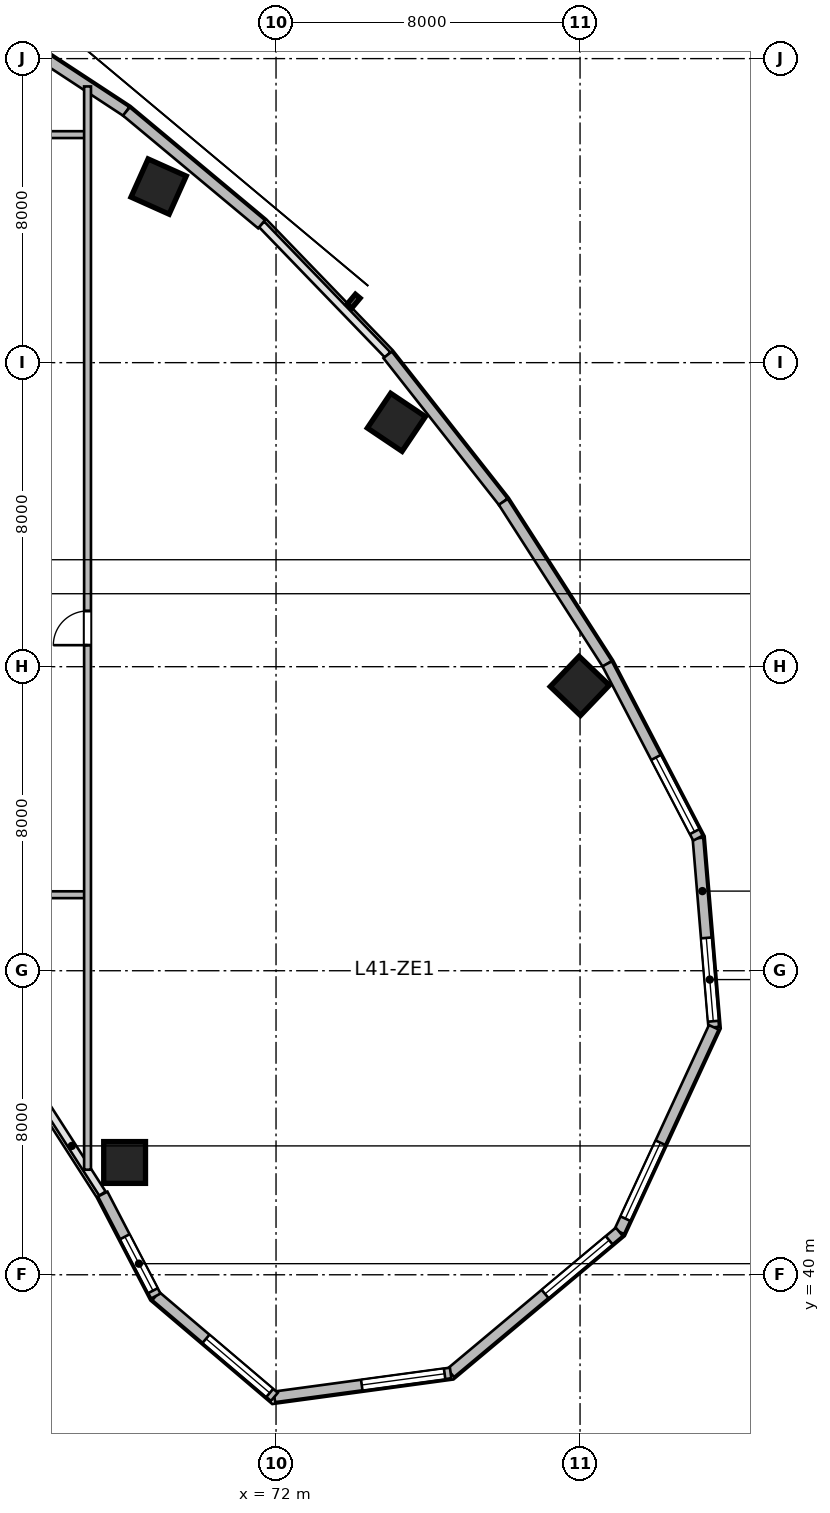
"""IFC4 building model, lengths in metres.
Left out: names, types, materials, properties, quantities, classifications, styles, units other than length and angle.
Written with IfcOpenShell. Run it as: python <this file> out.ifc"""

import sys

from ifc_helpers import new_model, si_unit, direction, frame, frame_2d, origin, origin_2d, place, context, subcontext, project, spatial, rectangle, circle, extrude, source, transform, mapped, element, fill, save


model = new_model("IFC4")
c1 = context("Model", 3, precision=1e-05, world=origin(), true_north=direction((0.0, 1.0)))
c2 = subcontext(c1, "Body", "Model", "MODEL_VIEW")
j1 = project(units=[si_unit("LENGTHUNIT", "METRE"), si_unit("PLANEANGLEUNIT", "RADIAN")], contexts=[c1])
p1 = place(None, origin())
s1 = spatial("IfcSite", under=j1, at=p1, CompositionType="ELEMENT")
p2 = place(p1, origin())
s2 = spatial("IfcBuilding", under=s1, at=p2, CompositionType="ELEMENT")
p3 = place(p2, frame((0.0, 0.0, 170.1)))
s3 = spatial("IfcBuildingStorey", under=s2, at=p3, CompositionType="ELEMENT", Elevation=170.1)
m1 = source(origin(), c2, "Body", "SweptSolid", [
    extrude(rectangle(XDim=1.1, YDim=1.1, at=origin_2d()), origin(), (0.0, 0.0, 1.0), 3.9),
])
for number, where, z_axis, x_axis in (
    (1, (68.91, 68.633, 0.0), (0.0, 0.0, 1.0), (0.409, 0.912, 0.0)),
    (2, (75.167, 62.43, 0.0), (0.0, 0.0, 1.0), (0.558, 0.83, 0.0)),
):
    element("IfcColumn", number, at=place(p3, frame(where, z_axis=z_axis, x_axis=x_axis)), inside=s3, PredefinedType="COLUMN", context=c2, shape_type="MappedRepresentation", body=[
        mapped(m1, transform((0.0, 0.0, 0.0), scale=1.0)),
    ])
m2 = source(origin(), c2, "Body", "SweptSolid", [
    extrude(circle(Radius=0.55, at=origin_2d()), origin(), (0.0, 0.0, 1.0), 3.9),
])
p4 = place(p3, frame((68.015, 42.955, 0.0), z_axis=(0.0, 0.0, 1.0), x_axis=(0.690756218984, 0.723087716626, 0.0)))
e3 = element("IfcColumn", 3, at=p4, inside=s3, PredefinedType="COLUMN", context=c2, shape_type="MappedRepresentation", body=[
    mapped(m2, transform((0.0, 0.0, 0.0), scale=1.0)),
])
p5 = place(p3, frame((79.993, 55.494, 0.0), z_axis=(0.0, 0.0, 1.0), x_axis=(0.690756218984, 0.723087716626, 0.0)))
e4 = element("IfcColumn", 4, at=p5, inside=s3, PredefinedType="COLUMN", context=c2, shape_type="MappedRepresentation", body=[
    mapped(m1, transform((0.0, 0.0, 0.0), scale=1.0)),
])
m3 = source(origin(), c2, "Body", "SweptSolid", [
    extrude(rectangle(XDim=4.994, YDim=0.28, at=frame_2d((2.497, 0.0))), origin(), (0.0, 0.0, 1.0), 3.65),
])
p6 = place(p3, frame((83.102, 51.489, 0.0), z_axis=(0.0, 0.0, 1.0), x_axis=(0.083344839916, -0.996520766296, 0.0)))
e5 = element("IfcWall", 5, at=p6, inside=s3, PredefinedType="SOLIDWALL", context=c2, shape_type="MappedRepresentation", body=[
    mapped(m3, transform((0.0, 0.0, 0.0), scale=1.0)),
])
p7 = place(p6, frame((2.635, 0.0, 0.95)))
e6 = element("IfcOpeningElement", 6, at=p7, cuts=e5, PredefinedType="OPENING", context=c2, shape_type="SweptSolid", body=[
    extrude(rectangle(XDim=2.2, YDim=2.1, at=frame_2d((1.1, 1.05))), frame((0.0, 0.15, 0.0), z_axis=(0.0, -1.0, 0.0), x_axis=(1.0, 0.0, 0.0)), (0.0, 0.0, 1.0), 0.3),
])
m4 = source(origin(), c2, "Body", "SweptSolid", [
    extrude(rectangle(XDim=5.927, YDim=0.28, at=frame_2d((2.964, 0.0))), origin(), (0.0, 0.0, 1.0), 3.65),
])
p8 = place(p3, frame((83.519, 46.512, 0.0), z_axis=(0.0, 0.0, 1.0), x_axis=(-0.419656204795, -0.907683132914, 0.0)))
e7 = element("IfcWall", 7, at=p8, inside=s3, PredefinedType="SOLIDWALL", context=c2, shape_type="MappedRepresentation", body=[
    mapped(m4, transform((0.0, 0.0, 0.0), scale=1.0)),
])
p9 = place(p8, frame((3.346, 0.0, 0.95)))
e8 = element("IfcOpeningElement", 8, at=p9, cuts=e7, PredefinedType="OPENING", context=c2, shape_type="SweptSolid", body=[
    extrude(rectangle(XDim=2.2, YDim=2.1, at=frame_2d((1.1, 1.05))), frame((0.0, 0.15, 0.0), z_axis=(0.0, -1.0, 0.0), x_axis=(1.0, 0.0, 0.0)), (0.0, 0.0, 1.0), 0.3),
])
m5 = source(origin(), c2, "Body", "SweptSolid", [
    extrude(rectangle(XDim=5.786, YDim=0.28, at=frame_2d((2.893, 0.0))), origin(), (0.0, 0.0, 1.0), 3.65),
])
p10 = place(p3, frame((81.031, 41.131, 0.0), z_axis=(0.0, 0.0, 1.0), x_axis=(-0.766711306852, -0.641992034176, 0.0)))
e9 = element("IfcWall", 9, at=p10, inside=s3, PredefinedType="SOLIDWALL", context=c2, shape_type="MappedRepresentation", body=[
    mapped(m5, transform((0.0, 0.0, 0.0), scale=1.0)),
])
p11 = place(p10, frame((0.347, 0.0, 0.95)))
e10 = element("IfcOpeningElement", 10, at=p11, cuts=e9, PredefinedType="OPENING", context=c2, shape_type="SweptSolid", body=[
    extrude(rectangle(XDim=2.2, YDim=2.1, at=frame_2d((1.1, 1.05))), frame((0.0, 0.15, 0.0), z_axis=(0.0, -1.0, 0.0), x_axis=(1.0, 0.0, 0.0)), (0.0, 0.0, 1.0), 0.3),
])
m6 = source(origin(), c2, "Body", "SweptSolid", [
    extrude(rectangle(XDim=4.68, YDim=0.28, at=frame_2d((2.34, 0.0))), origin(), (0.0, 0.0, 1.0), 3.65),
])
p12 = place(p3, frame((76.594, 37.417, 0.0), z_axis=(0.0, 0.0, 1.0), x_axis=(-0.990931146435, -0.134370618162, 0.0)))
e11 = element("IfcWall", 11, at=p12, inside=s3, PredefinedType="SOLIDWALL", context=c2, shape_type="MappedRepresentation", body=[
    mapped(m6, transform((0.0, 0.0, 0.0), scale=1.0)),
])
p13 = place(p12, frame((0.16, 0.0, 0.95)))
e12 = element("IfcOpeningElement", 12, at=p13, cuts=e11, PredefinedType="OPENING", context=c2, shape_type="SweptSolid", body=[
    extrude(rectangle(XDim=2.2, YDim=2.1, at=frame_2d((1.1, 1.05))), frame((0.0, 0.15, 0.0), z_axis=(0.0, -1.0, 0.0), x_axis=(1.0, 0.0, 0.0)), (0.0, 0.0, 1.0), 0.3),
])
m7 = source(origin(), c2, "Body", "SweptSolid", [
    extrude(rectangle(XDim=4.096, YDim=0.28, at=frame_2d((2.048, 0.0))), origin(), (0.0, 0.0, 1.0), 3.65),
])
p14 = place(p3, frame((71.957, 36.788, 0.0), z_axis=(0.0, 0.0, 1.0), x_axis=(-0.761926081737, 0.647663991564, 0.0)))
e13 = element("IfcWall", 13, at=p14, inside=s3, PredefinedType="SOLIDWALL", context=c2, shape_type="MappedRepresentation", body=[
    mapped(m7, transform((0.0, 0.0, 0.0), scale=1.0)),
])
p15 = place(p14, frame((0.16, 0.0, 0.95)))
e14 = element("IfcOpeningElement", 14, at=p15, cuts=e13, PredefinedType="OPENING", context=c2, shape_type="SweptSolid", body=[
    extrude(rectangle(XDim=2.2, YDim=2.1, at=frame_2d((1.1, 1.05))), frame((0.0, 0.15, 0.0), z_axis=(0.0, -1.0, 0.0), x_axis=(1.0, 0.0, 0.0)), (0.0, 0.0, 1.0), 0.3),
])
m8 = source(origin(), c2, "Body", "SweptSolid", [
    extrude(rectangle(XDim=3.024, YDim=0.28, at=frame_2d((1.512, 0.0))), origin(), (0.0, 0.0, 1.0), 3.65),
])
p16 = place(p3, frame((68.836, 39.44, 0.0), z_axis=(0.0, 0.0, 1.0), x_axis=(-0.461718746531, 0.887026380161, 0.0)))
e15 = element("IfcWall", 15, at=p16, inside=s3, PredefinedType="SOLIDWALL", context=c2, shape_type="MappedRepresentation", body=[
    mapped(m8, transform((0.0, 0.0, 0.0), scale=1.0)),
])
p17 = place(p16, frame((0.16, 0.0, 0.95)))
e16 = element("IfcOpeningElement", 16, at=p17, cuts=e15, PredefinedType="OPENING", context=c2, shape_type="SweptSolid", body=[
    extrude(rectangle(XDim=1.6, YDim=1.9, at=frame_2d((0.8, 0.95))), frame((0.0, 0.15, 0.0), z_axis=(0.0, -1.0, 0.0), x_axis=(1.0, 0.0, 0.0)), (0.0, 0.0, 1.0), 0.3),
])
m9 = source(origin(), c2, "Body", "SweptSolid", [
    extrude(rectangle(XDim=4.501, YDim=0.28, at=frame_2d((2.25, 0.0))), origin(), (0.0, 0.0, 1.0), 3.65),
])
p18 = place(p3, frame((64.298, 73.08, 0.0), z_axis=(0.0, 0.0, 1.0), x_axis=(0.835984920737, -0.548752414391, 0.0)))
e17 = element("IfcWall", 17, at=p18, inside=s3, PredefinedType="SOLIDWALL", context=c2, shape_type="MappedRepresentation", body=[
    mapped(m9, transform((0.0, 0.0, 0.0), scale=1.0)),
])
m10 = source(origin(), c2, "Body", "SweptSolid", [
    extrude(rectangle(XDim=4.634, YDim=0.28, at=frame_2d((2.317, 0.0))), origin(), (0.0, 0.0, 1.0), 3.65),
])
p19 = place(p3, frame((68.061, 70.61, 0.0), z_axis=(0.0, 0.0, 1.0), x_axis=(0.767910229096, -0.640557475993, 0.0)))
e18 = element("IfcWall", 18, at=p19, inside=s3, PredefinedType="SOLIDWALL", context=c2, shape_type="MappedRepresentation", body=[
    mapped(m10, transform((0.0, 0.0, 0.0), scale=1.0)),
])
m11 = source(origin(), c2, "Body", "SweptSolid", [
    extrude(rectangle(XDim=4.922, YDim=0.28, at=frame_2d((2.461, 0.0))), origin(), (0.0, 0.0, 1.0), 3.65),
])
p20 = place(p3, frame((74.936, 64.206, 0.0), z_axis=(0.0, 0.0, 1.0), x_axis=(0.61817639101, -0.786039407153, 0.0)))
e19 = element("IfcWall", 19, at=p20, inside=s3, PredefinedType="SOLIDWALL", context=c2, shape_type="MappedRepresentation", body=[
    mapped(m11, transform((0.0, 0.0, 0.0), scale=1.0)),
])
m12 = source(origin(), c2, "Body", "SweptSolid", [
    extrude(rectangle(XDim=5.065, YDim=0.28, at=frame_2d((2.532, 0.0))), origin(), (0.0, 0.0, 1.0), 3.65),
])
p21 = place(p3, frame((77.979, 60.338, 0.0), z_axis=(0.0, 0.0, 1.0), x_axis=(0.540177618806, -0.841551032404, 0.0)))
e20 = element("IfcWall", 20, at=p21, inside=s3, PredefinedType="SOLIDWALL", context=c2, shape_type="MappedRepresentation", body=[
    mapped(m12, transform((0.0, 0.0, 0.0), scale=1.0)),
])
m13 = source(origin(), c2, "Body", "SweptSolid", [
    extrude(rectangle(XDim=5.171, YDim=0.28, at=frame_2d((2.585, 0.0))), origin(), (0.0, 0.0, 1.0), 3.65),
])
p22 = place(p3, frame((80.715, 56.075, 0.0), z_axis=(0.0, 0.0, 1.0), x_axis=(0.461752581363, -0.887008767491, 0.0)))
e21 = element("IfcWall", 21, at=p22, inside=s3, PredefinedType="SOLIDWALL", context=c2, shape_type="MappedRepresentation", body=[
    mapped(m13, transform((0.0, 0.0, 0.0), scale=1.0)),
])
p23 = place(p22, frame((2.778, 0.0, 0.95)))
e22 = element("IfcOpeningElement", 22, at=p23, cuts=e21, PredefinedType="OPENING", context=c2, shape_type="SweptSolid", body=[
    extrude(rectangle(XDim=2.2, YDim=2.1, at=frame_2d((1.1, 1.05))), frame((0.0, 0.15, 0.0), z_axis=(0.0, -1.0, 0.0), x_axis=(1.0, 0.0, 0.0)), (0.0, 0.0, 1.0), 0.3),
])
m14 = source(origin(), c2, "Body", "SweptSolid", [
    extrude(rectangle(XDim=2.5, YDim=0.18, at=frame_2d((1.25, 0.0))), origin(), (0.0, 0.0, 1.0), 3.65),
])
p24 = place(p3, frame((64.5, 50.0, 0.0), z_axis=(0.0, 0.0, 1.0), x_axis=(1.0, 0.0, 0.0)))
e23 = element("IfcWall", 23, at=p24, inside=s3, PredefinedType="PLUMBINGWALL", context=c2, shape_type="MappedRepresentation", body=[
    mapped(m14, transform((0.0, 0.0, 0.0), scale=1.0)),
])
m15 = source(origin(), c2, "Body", "SweptSolid", [
    extrude(rectangle(XDim=2.5, YDim=0.18, at=frame_2d((1.25, 0.0))), origin(), (0.0, 0.0, 1.0), 3.022),
])
p25 = place(p3, frame((64.5, 70.0, 0.0), z_axis=(0.0, 0.0, 1.0), x_axis=(1.0, 0.0, 0.0)))
e24 = element("IfcWall", 24, at=p25, inside=s3, PredefinedType="PLUMBINGWALL", context=c2, shape_type="MappedRepresentation", body=[
    mapped(m15, transform((0.0, 0.0, 0.0), scale=1.0)),
])
m16 = source(origin(), c2, "Body", "SweptSolid", [
    extrude(rectangle(XDim=28.503, YDim=0.18, at=frame_2d((14.251, 0.0))), origin(), (0.0, 0.0, 1.0), 2.942),
])
p26 = place(p3, frame((67.04, 42.765, 0.0), z_axis=(0.0, 0.0, 1.0), x_axis=(0.0, 1.0, 0.0)))
e25 = element("IfcWall", 25, at=p26, inside=s3, PredefinedType="PLUMBINGWALL", context=c2, shape_type="MappedRepresentation", body=[
    mapped(m16, transform((0.0, 0.0, 0.0), scale=1.0)),
])
p27 = place(p26, frame((13.802, 0.0, 0.0)))
e26 = element("IfcOpeningElement", 26, at=p27, cuts=e25, PredefinedType="OPENING", context=c2, shape_type="SweptSolid", body=[
    extrude(rectangle(XDim=0.9, YDim=2.08, at=frame_2d((0.45, 1.04))), frame((0.0, 0.1, 0.0), z_axis=(0.0, -1.0, 0.0), x_axis=(1.0, 0.0, 0.0)), (0.0, 0.0, 1.0), 0.2),
])
m17 = source(origin(), c2, "Body", "SweptSolid", [
    extrude(rectangle(XDim=2.2, YDim=2.1, at=frame_2d((1.1, 1.05))), frame((0.0, 0.03, 0.0), z_axis=(0.0, -1.0, 0.0), x_axis=(1.0, 0.0, 0.0)), (0.0, 0.0, 1.0), 0.06),
])
p28 = place(p7, origin())
e27 = element("IfcWindow", 27, at=p28, inside=s3, PartitioningType="TRIPLE_PANEL_VERTICAL", PredefinedType="WINDOW", context=c2, shape_type="MappedRepresentation", body=[
    mapped(m17, transform((0.0, 0.0, 0.0), scale=1.0)),
])
fill(e6, e27)
p29 = place(p9, origin())
e28 = element("IfcWindow", 28, at=p29, inside=s3, PartitioningType="TRIPLE_PANEL_VERTICAL", PredefinedType="WINDOW", context=c2, shape_type="MappedRepresentation", body=[
    mapped(m17, transform((0.0, 0.0, 0.0), scale=1.0)),
])
fill(e8, e28)
p30 = place(p11, origin())
e29 = element("IfcWindow", 29, at=p30, inside=s3, PartitioningType="TRIPLE_PANEL_VERTICAL", PredefinedType="WINDOW", context=c2, shape_type="MappedRepresentation", body=[
    mapped(m17, transform((0.0, 0.0, 0.0), scale=1.0)),
])
fill(e10, e29)
p31 = place(p13, origin())
e30 = element("IfcWindow", 30, at=p31, inside=s3, PartitioningType="TRIPLE_PANEL_VERTICAL", PredefinedType="WINDOW", context=c2, shape_type="MappedRepresentation", body=[
    mapped(m17, transform((0.0, 0.0, 0.0), scale=1.0)),
])
fill(e12, e30)
p32 = place(p15, origin())
e31 = element("IfcWindow", 31, at=p32, inside=s3, PartitioningType="TRIPLE_PANEL_VERTICAL", PredefinedType="WINDOW", context=c2, shape_type="MappedRepresentation", body=[
    mapped(m17, transform((0.0, 0.0, 0.0), scale=1.0)),
])
fill(e14, e31)
m18 = source(origin(), c2, "Body", "SweptSolid", [
    extrude(rectangle(XDim=1.6, YDim=1.9, at=frame_2d((0.8, 0.95))), frame((0.0, 0.03, 0.0), z_axis=(0.0, -1.0, 0.0), x_axis=(1.0, 0.0, 0.0)), (0.0, 0.0, 1.0), 0.06),
])
p33 = place(p17, origin())
e32 = element("IfcWindow", 32, at=p33, inside=s3, PartitioningType="SINGLE_PANEL", PredefinedType="WINDOW", context=c2, shape_type="MappedRepresentation", body=[
    mapped(m18, transform((0.0, 0.0, 0.0), scale=1.0)),
])
fill(e16, e32)
p34 = place(p23, origin())
e33 = element("IfcWindow", 33, at=p34, inside=s3, PartitioningType="TRIPLE_PANEL_VERTICAL", PredefinedType="WINDOW", context=c2, shape_type="MappedRepresentation", body=[
    mapped(m17, transform((0.0, 0.0, 0.0), scale=1.0)),
])
fill(e22, e33)
m19 = source(origin(), c2, "Body", "SweptSolid", [
    extrude(rectangle(XDim=0.9, YDim=2.08, at=frame_2d((0.45, 1.04))), frame((0.0, 0.025, 0.0), z_axis=(0.0, -1.0, 0.0), x_axis=(1.0, 0.0, 0.0)), (0.0, 0.0, 1.0), 0.05),
])
p35 = place(p27, origin())
e34 = element("IfcDoor", 34, at=p35, inside=s3, OperationType="SINGLE_SWING_LEFT", PredefinedType="DOOR", context=c2, shape_type="MappedRepresentation", body=[
    mapped(m19, transform((0.0, 0.0, 0.0), scale=1.0)),
])
fill(e26, e34)
save(model, sys.argv[1])
